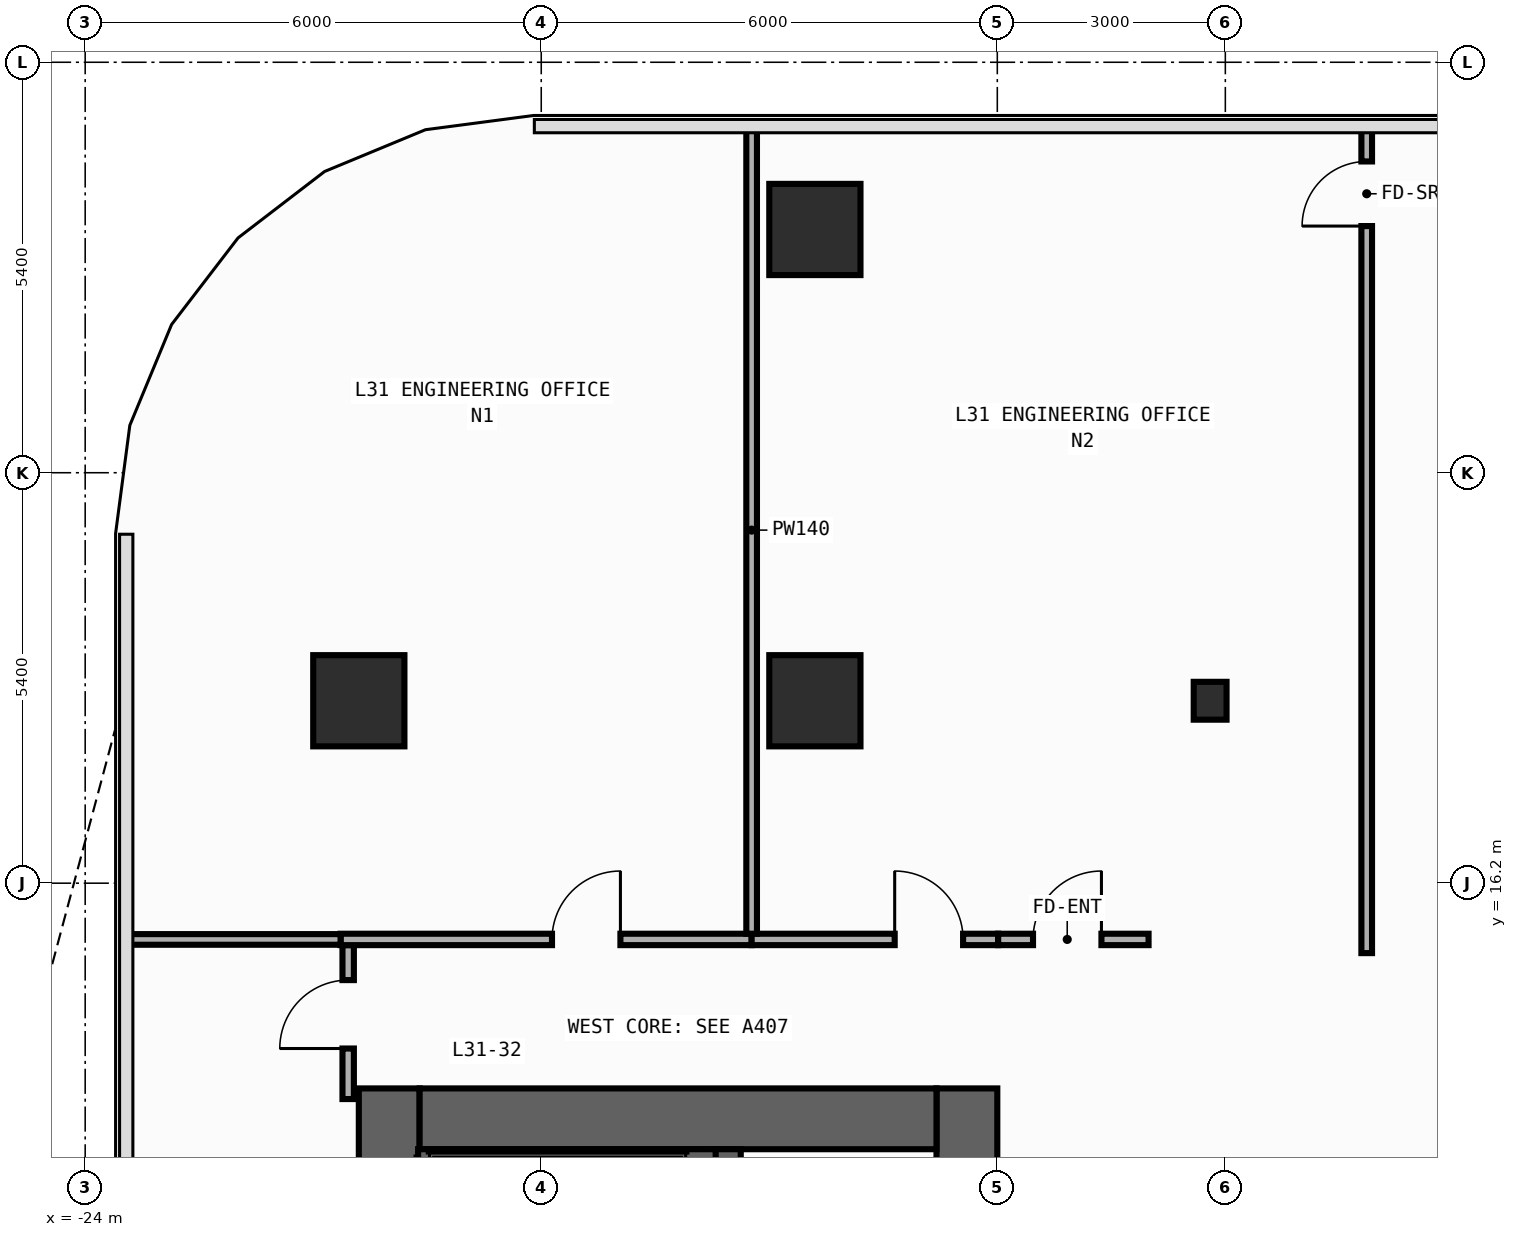
"""IFC4 building model, lengths in metres.
Left out: names, types, materials, properties, quantities, classifications, styles, units other than length and angle.
Written with IfcOpenShell. Run it as: python <this file> out.ifc"""

import sys

from ifc_helpers import new_model, si_unit, direction, frame, frame_2d, origin, origin_2d, place, context, subcontext, project, spatial, rectangle, i_section, extrude, element, fill, save


model = new_model("IFC4")
c1 = context("Model", 3, precision=1e-05, world=origin(), true_north=direction((0.0, 1.0)))
c2 = subcontext(c1, "Body", "Model", "MODEL_VIEW")
j1 = project(units=[si_unit("LENGTHUNIT", "METRE"), si_unit("PLANEANGLEUNIT", "RADIAN")], contexts=[c1])
p1 = place(None, origin())
s1 = spatial("IfcSite", under=j1, at=p1, CompositionType="ELEMENT")
p2 = place(p1, origin())
s2 = spatial("IfcBuilding", under=s1, at=p2, CompositionType="ELEMENT")
p3 = place(p2, frame((0.0, 0.0, 135.2)))
s3 = spatial("IfcBuildingStorey", under=s2, at=p3, CompositionType="ELEMENT", Elevation=135.2)
p4 = place(p3, frame((-20.0, -13.5, 0.0), z_axis=(0.0, 0.0, 1.0), x_axis=(0.0, 1.0, 0.0)))
e1 = element("IfcWall", 1, at=p4, inside=s3, PredefinedType="SHEAR", context=c2, shape_type="SweptSolid", body=[
    extrude(rectangle(XDim=27.0, YDim=0.8, at=frame_2d((13.5, 0.0))), origin(), (0.0, 0.0, 1.0), 3.94),
])
p5 = place(p3, frame((-12.4, -13.5, 0.0), z_axis=(0.0, 0.0, 1.0), x_axis=(0.0, 1.0, 0.0)))
e2 = element("IfcWall", 2, at=p5, inside=s3, PredefinedType="SHEAR", context=c2, shape_type="SweptSolid", body=[
    extrude(rectangle(XDim=27.0, YDim=0.8, at=frame_2d((13.5, 0.0))), origin(), (0.0, 0.0, 1.0), 3.94),
])
p6 = place(p5, frame((10.35, 0.0, 0.0)))
e3 = element("IfcOpeningElement", 3, at=p6, cuts=e2, PredefinedType="OPENING", context=c2, shape_type="SweptSolid", body=[
    extrude(rectangle(XDim=1.1, YDim=2.2, at=frame_2d((0.55, 1.1))), frame((0.0, 0.41, 0.0), z_axis=(0.0, -1.0, 0.0), x_axis=(1.0, 0.0, 0.0)), (0.0, 0.0, 1.0), 0.82),
])
p7 = place(p5, frame((7.15, 0.0, 0.0)))
e4 = element("IfcOpeningElement", 4, at=p7, cuts=e2, PredefinedType="OPENING", context=c2, shape_type="SweptSolid", body=[
    extrude(rectangle(XDim=1.1, YDim=2.2, at=frame_2d((0.55, 1.1))), frame((0.0, 0.41, 0.0), z_axis=(0.0, -1.0, 0.0), x_axis=(1.0, 0.0, 0.0)), (0.0, 0.0, 1.0), 0.82),
])
p8 = place(p5, frame((3.95, 0.0, 0.0)))
e5 = element("IfcOpeningElement", 5, at=p8, cuts=e2, PredefinedType="OPENING", context=c2, shape_type="SweptSolid", body=[
    extrude(rectangle(XDim=1.1, YDim=2.2, at=frame_2d((0.55, 1.1))), frame((0.0, 0.41, 0.0), z_axis=(0.0, -1.0, 0.0), x_axis=(1.0, 0.0, 0.0)), (0.0, 0.0, 1.0), 0.82),
])
p9 = place(p5, frame((15.175, 0.0, 0.0)))
e6 = element("IfcOpeningElement", 6, at=p9, cuts=e2, PredefinedType="OPENING", context=c2, shape_type="SweptSolid", body=[
    extrude(rectangle(XDim=0.85, YDim=2.1, at=frame_2d((0.425, 1.05))), frame((0.0, 0.41, 0.0), z_axis=(0.0, -1.0, 0.0), x_axis=(1.0, 0.0, 0.0)), (0.0, 0.0, 1.0), 0.82),
])
p10 = place(p5, frame((21.275, 0.0, 0.0)))
e7 = element("IfcOpeningElement", 7, at=p10, cuts=e2, PredefinedType="OPENING", context=c2, shape_type="SweptSolid", body=[
    extrude(rectangle(XDim=0.85, YDim=2.1, at=frame_2d((0.425, 1.05))), frame((0.0, 0.41, 0.0), z_axis=(0.0, -1.0, 0.0), x_axis=(1.0, 0.0, 0.0)), (0.0, 0.0, 1.0), 0.82),
])
p11 = place(p5, frame((12.725, 0.0, 0.0)))
e8 = element("IfcOpeningElement", 8, at=p11, cuts=e2, PredefinedType="OPENING", context=c2, shape_type="SweptSolid", body=[
    extrude(rectangle(XDim=1.15, YDim=2.2, at=frame_2d((0.575, 1.1))), frame((0.0, 0.41, 0.0), z_axis=(0.0, -1.0, 0.0), x_axis=(1.0, 0.0, 0.0)), (0.0, 0.0, 1.0), 0.82),
])
p12 = place(p5, frame((1.625, 0.0, 0.0)))
e9 = element("IfcOpeningElement", 9, at=p12, cuts=e2, PredefinedType="OPENING", context=c2, shape_type="SweptSolid", body=[
    extrude(rectangle(XDim=0.85, YDim=2.1, at=frame_2d((0.425, 1.05))), frame((0.0, 0.41, 0.0), z_axis=(0.0, -1.0, 0.0), x_axis=(1.0, 0.0, 0.0)), (0.0, 0.0, 1.0), 0.82),
])
p13 = place(p3, frame((-19.6, 13.1, 0.0), z_axis=(0.0, 0.0, 1.0), x_axis=(1.0, 0.0, 0.0)))
e10 = element("IfcWall", 10, at=p13, inside=s3, PredefinedType="SHEAR", context=c2, shape_type="SweptSolid", body=[
    extrude(rectangle(XDim=6.8, YDim=0.8, at=frame_2d((3.4, 0.0))), origin(), (0.0, 0.0, 1.0), 3.94),
])
p14 = place(p3, frame((-15.55, -12.7, 0.0), z_axis=(0.0, 0.0, 1.0), x_axis=(0.0, 1.0, 0.0)))
e11 = element("IfcWall", 11, at=p14, inside=s3, PredefinedType="SHEAR", context=c2, shape_type="SweptSolid", body=[
    extrude(rectangle(XDim=25.4, YDim=0.35, at=frame_2d((12.7, 0.0))), origin(), (0.0, 0.0, 1.0), 3.94),
])
p15 = place(p14, frame((11.925, 0.0, 0.0)))
e12 = element("IfcOpeningElement", 12, at=p15, cuts=e11, PredefinedType="OPENING", context=c2, shape_type="SweptSolid", body=[
    extrude(rectangle(XDim=1.15, YDim=2.2, at=frame_2d((0.575, 1.1))), frame((0.0, 0.185, 0.0), z_axis=(0.0, -1.0, 0.0), x_axis=(1.0, 0.0, 0.0)), (0.0, 0.0, 1.0), 0.37),
])
p16 = place(p14, frame((0.825, 0.0, 0.0)))
e13 = element("IfcOpeningElement", 13, at=p16, cuts=e11, PredefinedType="OPENING", context=c2, shape_type="SweptSolid", body=[
    extrude(rectangle(XDim=0.85, YDim=2.1, at=frame_2d((0.425, 1.05))), frame((0.0, 0.185, 0.0), z_axis=(0.0, -1.0, 0.0), x_axis=(1.0, 0.0, 0.0)), (0.0, 0.0, 1.0), 0.37),
])
p17 = place(p3, frame((-19.62, 12.59, 0.0), z_axis=(0.0, 0.0, 1.0), x_axis=(1.0, 0.0, 0.0)))
e14 = element("IfcWall", 14, at=p17, inside=s3, PredefinedType="SHEAR", context=c2, shape_type="SweptSolid", body=[
    extrude(rectangle(XDim=3.915, YDim=0.22, at=frame_2d((1.958, 0.0))), origin(), (0.0, 0.0, 1.0), 3.94),
])
p18 = place(p3, frame((-9.2, 18.6, 0.0), z_axis=(0.0, 0.0, 1.0), x_axis=(1.0, 0.0, 0.0)))
e15 = element("IfcColumn", 15, at=p18, inside=s3, PredefinedType="COLUMN", context=c2, shape_type="SweptSolid", body=[
    extrude(i_section(OverallWidth=0.432, OverallDepth=0.498, WebThickness=0.045, FlangeThickness=0.07, FilletRadius=0.022, at=origin_2d()), origin(), (0.0, 0.0, 1.0), 4.2),
])
for number, where, z_axis, x_axis in (
    (16, (-20.4, 18.6, 0.0), (0.0, 0.0, 1.0), (1.0, 0.0, 0.0)),
    (17, (-14.4, 18.6, 0.0), (0.0, 0.0, 1.0), (1.0, 0.0, 0.0)),
    (18, (-14.4, 24.8, 0.0), (0.0, 0.0, 1.0), (1.0, 0.0, 0.0)),
):
    element("IfcColumn", number, at=place(p3, frame(where, z_axis=z_axis, x_axis=x_axis)), inside=s3, PredefinedType="COLUMN", context=c2, shape_type="SweptSolid", body=[
        extrude(rectangle(XDim=1.2, YDim=1.2, at=origin_2d()), origin(), (0.0, 0.0, 1.0), 4.2),
    ])
p19 = place(p3, frame((-11.99, 15.46, 0.0), z_axis=(0.0, 0.0, 1.0), x_axis=(1.0, 0.0, 0.0)))
e19 = element("IfcWall", 19, at=p19, inside=s3, PredefinedType="PARTITIONING", context=c2, shape_type="SweptSolid", body=[
    extrude(rectangle(XDim=1.98, YDim=0.15, at=frame_2d((0.99, 0.0))), origin(), (0.0, 0.0, 1.0), 3.94),
])
p20 = place(p19, frame((0.46, 0.0, 0.0)))
e20 = element("IfcOpeningElement", 20, at=p20, cuts=e19, PredefinedType="OPENING", context=c2, shape_type="SweptSolid", body=[
    extrude(rectangle(XDim=0.9, YDim=2.15, at=frame_2d((0.45, 1.075))), frame((0.0, 0.085, 0.0), z_axis=(0.0, -1.0, 0.0), x_axis=(1.0, 0.0, 0.0)), (0.0, 0.0, 1.0), 0.17),
])
p21 = place(p3, frame((-20.54, 13.36, 0.0), z_axis=(0.0, 0.0, 1.0), x_axis=(0.0, 1.0, 0.0)))
e21 = element("IfcWall", 21, at=p21, inside=s3, PredefinedType="PARTITIONING", context=c2, shape_type="SweptSolid", body=[
    extrude(rectangle(XDim=2.025, YDim=0.15, at=frame_2d((1.012, 0.0))), origin(), (0.0, 0.0, 1.0), 3.94),
])
p22 = place(p21, frame((0.665, 0.0, 0.0)))
e22 = element("IfcOpeningElement", 22, at=p22, cuts=e21, PredefinedType="OPENING", context=c2, shape_type="SweptSolid", body=[
    extrude(rectangle(XDim=0.9, YDim=2.15, at=frame_2d((0.45, 1.075))), frame((0.0, 0.085, 0.0), z_axis=(0.0, -1.0, 0.0), x_axis=(1.0, 0.0, 0.0)), (0.0, 0.0, 1.0), 0.17),
])
p23 = place(p3, frame((-20.64, 15.46, 0.0), z_axis=(0.0, 0.0, 1.0), x_axis=(1.0, 0.0, 0.0)))
e23 = element("IfcWall", 23, at=p23, inside=s3, PredefinedType="PARTITIONING", context=c2, shape_type="SweptSolid", body=[
    extrude(rectangle(XDim=5.408, YDim=0.15, at=frame_2d((2.704, 0.0))), origin(), (0.0, 0.0, 1.0), 3.94),
])
p24 = place(p23, frame((2.781, 0.0, 0.0)))
e24 = element("IfcOpeningElement", 24, at=p24, cuts=e23, PredefinedType="OPENING", context=c2, shape_type="SweptSolid", body=[
    extrude(rectangle(XDim=0.9, YDim=2.15, at=frame_2d((0.45, 1.075))), frame((0.0, 0.085, 0.0), z_axis=(0.0, -1.0, 0.0), x_axis=(1.0, 0.0, 0.0)), (0.0, 0.0, 1.0), 0.17),
])
p25 = place(p3, frame((-15.232, 15.46, 0.0), z_axis=(0.0, 0.0, 1.0), x_axis=(1.0, 0.0, 0.0)))
e25 = element("IfcWall", 25, at=p25, inside=s3, PredefinedType="PARTITIONING", context=c2, shape_type="SweptSolid", body=[
    extrude(rectangle(XDim=3.242, YDim=0.15, at=frame_2d((1.621, 0.0))), origin(), (0.0, 0.0, 1.0), 3.94),
])
p26 = place(p25, frame((1.882, 0.0, 0.0)))
e26 = element("IfcOpeningElement", 26, at=p26, cuts=e25, PredefinedType="OPENING", context=c2, shape_type="SweptSolid", body=[
    extrude(rectangle(XDim=0.9, YDim=2.15, at=frame_2d((0.45, 1.075))), frame((0.0, 0.085, 0.0), z_axis=(0.0, -1.0, 0.0), x_axis=(1.0, 0.0, 0.0)), (0.0, 0.0, 1.0), 0.17),
])
p27 = place(p3, frame((-23.455, 15.46, 0.0), z_axis=(0.0, 0.0, 1.0), x_axis=(1.0, 0.0, 0.0)))
e27 = element("IfcWall", 27, at=p27, inside=s3, PredefinedType="PARTITIONING", context=c2, shape_type="SweptSolid", body=[
    extrude(rectangle(XDim=2.815, YDim=0.14, at=frame_2d((1.408, 0.0))), origin(), (0.0, 0.0, 1.0), 3.94),
])
p28 = place(p3, frame((-15.232, 15.535, 0.0), z_axis=(0.0, 0.0, 1.0), x_axis=(0.0, 1.0, 0.0)))
e28 = element("IfcWall", 28, at=p28, inside=s3, PredefinedType="PARTITIONING", context=c2, shape_type="SweptSolid", body=[
    extrude(rectangle(XDim=10.62, YDim=0.14, at=frame_2d((5.31, 0.0))), origin(), (0.0, 0.0, 1.0), 3.94),
])
p29 = place(p3, frame((-7.14, 15.28, 0.0), z_axis=(0.0, 0.0, 1.0), x_axis=(0.0, 1.0, 0.0)))
e29 = element("IfcWall", 29, at=p29, inside=s3, PredefinedType="PARTITIONING", context=c2, shape_type="SweptSolid", body=[
    extrude(rectangle(XDim=10.875, YDim=0.14, at=frame_2d((5.438, 0.0))), origin(), (0.0, 0.0, 1.0), 3.94),
])
p30 = place(p29, frame((9.565, 0.0, 0.0)))
e30 = element("IfcOpeningElement", 30, at=p30, cuts=e29, PredefinedType="OPENING", context=c2, shape_type="SweptSolid", body=[
    extrude(rectangle(XDim=0.85, YDim=2.1, at=frame_2d((0.425, 1.05))), frame((0.0, 0.08, 0.0), z_axis=(0.0, -1.0, 0.0), x_axis=(1.0, 0.0, 0.0)), (0.0, 0.0, 1.0), 0.16),
])
p31 = place(p20, origin())
e31 = element("IfcDoor", 31, at=p31, inside=s3, OperationType="SINGLE_SWING_RIGHT", PredefinedType="DOOR", context=c2, shape_type="SweptSolid", body=[
    extrude(rectangle(XDim=0.9, YDim=2.15, at=frame_2d((0.45, 1.075))), frame((0.0, 0.025, 0.0), z_axis=(0.0, -1.0, 0.0), x_axis=(1.0, 0.0, 0.0)), (0.0, 0.0, 1.0), 0.05),
])
fill(e20, e31)
p32 = place(p22, origin())
e32 = element("IfcDoor", 32, at=p32, inside=s3, OperationType="SINGLE_SWING_LEFT", PredefinedType="DOOR", context=c2, shape_type="SweptSolid", body=[
    extrude(rectangle(XDim=0.9, YDim=2.15, at=frame_2d((0.45, 1.075))), frame((0.0, 0.025, 0.0), z_axis=(0.0, -1.0, 0.0), x_axis=(1.0, 0.0, 0.0)), (0.0, 0.0, 1.0), 0.05),
])
fill(e22, e32)
p33 = place(p24, origin())
e33 = element("IfcDoor", 33, at=p33, inside=s3, OperationType="SINGLE_SWING_RIGHT", PredefinedType="DOOR", context=c2, shape_type="SweptSolid", body=[
    extrude(rectangle(XDim=0.9, YDim=2.15, at=frame_2d((0.45, 1.075))), frame((0.0, 0.025, 0.0), z_axis=(0.0, -1.0, 0.0), x_axis=(1.0, 0.0, 0.0)), (0.0, 0.0, 1.0), 0.05),
])
fill(e24, e33)
p34 = place(p26, origin())
e34 = element("IfcDoor", 34, at=p34, inside=s3, OperationType="SINGLE_SWING_LEFT", PredefinedType="DOOR", context=c2, shape_type="SweptSolid", body=[
    extrude(rectangle(XDim=0.9, YDim=2.15, at=frame_2d((0.45, 1.075))), frame((0.0, 0.025, 0.0), z_axis=(0.0, -1.0, 0.0), x_axis=(1.0, 0.0, 0.0)), (0.0, 0.0, 1.0), 0.05),
])
fill(e26, e34)
p35 = place(p30, origin())
e35 = element("IfcDoor", 35, at=p35, inside=s3, OperationType="SINGLE_SWING_LEFT", PredefinedType="DOOR", context=c2, shape_type="SweptSolid", body=[
    extrude(rectangle(XDim=0.85, YDim=2.1, at=frame_2d((0.425, 1.05))), frame((0.0, 0.025, 0.0), z_axis=(0.0, -1.0, 0.0), x_axis=(1.0, 0.0, 0.0)), (0.0, 0.0, 1.0), 0.05),
])
fill(e30, e35)
save(model, sys.argv[1])
